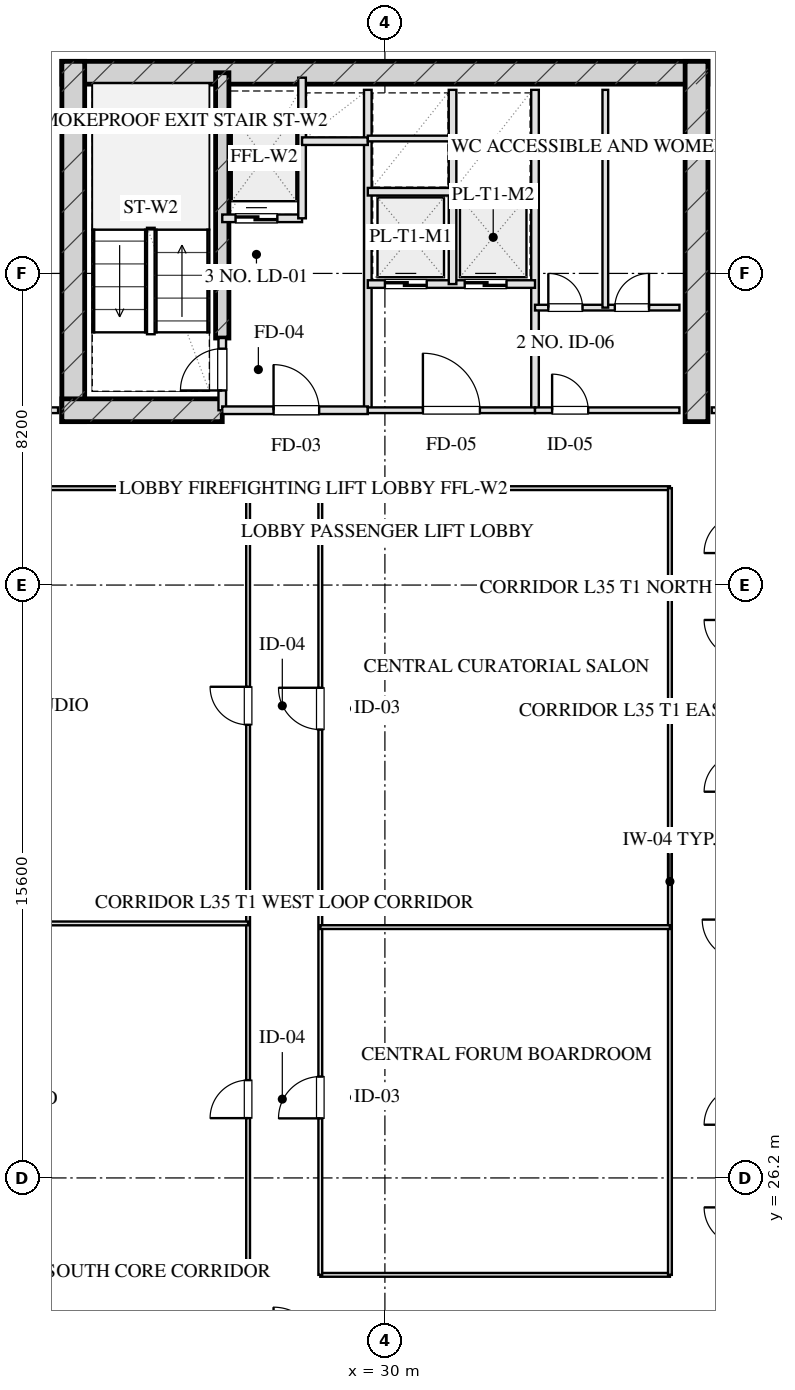
"""IFC4 building model, lengths in metres.
Left out: names, types, materials, properties, quantities, classifications, styles, units other than length and angle.
Written with IfcOpenShell. Run it as: python <this file> out.ifc"""

import sys

from ifc_helpers import new_model, si_unit, direction, frame, frame_2d, origin, place, context, subcontext, project, spatial, rectangle, extrude, element, fill, save


model = new_model("IFC4")
c1 = context("Model", 3, precision=1e-05, world=origin(), true_north=direction((0.0, 1.0)))
c2 = subcontext(c1, "Body", "Model", "MODEL_VIEW")
j1 = project(units=[si_unit("LENGTHUNIT", "METRE"), si_unit("PLANEANGLEUNIT", "RADIAN")], contexts=[c1])
p1 = place(None, origin())
s1 = spatial("IfcSite", under=j1, at=p1, CompositionType="ELEMENT")
p2 = place(p1, origin())
s2 = spatial("IfcBuilding", under=s1, at=p2, CompositionType="ELEMENT")
p3 = place(p2, frame((0.0, 0.0, 134.55)))
s3 = spatial("IfcBuildingStorey", under=s2, at=p3, CompositionType="ELEMENT", Elevation=134.55)
p4 = place(p3, frame((21.5, 55.28, 0.0), z_axis=(0.0, 0.0, 1.0), x_axis=(1.0, 0.0, 0.0)))
e1 = element("IfcWall", 1, at=p4, inside=s3, PredefinedType="SHEAR", context=c2, shape_type="SweptSolid", body=[
    extrude(rectangle(XDim=17.0, YDim=0.6, at=frame_2d((8.5, 0.0))), origin(), (0.0, 0.0, 1.0), 3.45),
])
for number, where, z_axis, x_axis in (
    (2, (21.8, 46.1, 0.0), (0.0, 0.0, 1.0), (0.0, 1.0, 0.0)),
    (3, (38.2, 46.1, 0.0), (0.0, 0.0, 1.0), (0.0, 1.0, 0.0)),
):
    element("IfcWall", number, at=place(p3, frame(where, z_axis=z_axis, x_axis=x_axis)), inside=s3, PredefinedType="SHEAR", context=c2, shape_type="SweptSolid", body=[
        extrude(rectangle(XDim=9.48, YDim=0.6, at=frame_2d((4.74, 0.0))), origin(), (0.0, 0.0, 1.0), 3.45),
    ])
p5 = place(p3, frame((25.72, 48.3, 0.0), z_axis=(0.0, 0.0, 1.0), x_axis=(0.0, 1.0, 0.0)))
e4 = element("IfcWall", 4, at=p5, inside=s3, PredefinedType="SHEAR", context=c2, shape_type="SweptSolid", body=[
    extrude(rectangle(XDim=6.98, YDim=0.35, at=frame_2d((3.49, 0.0))), origin(), (0.0, 0.0, 1.0), 3.45),
])
p6 = place(p3, frame((21.5, 46.4, 0.0), z_axis=(0.0, 0.0, 1.0), x_axis=(1.0, 0.0, 0.0)))
e5 = element("IfcWall", 5, at=p6, inside=s3, PredefinedType="SHEAR", context=c2, shape_type="SweptSolid", body=[
    extrude(rectangle(XDim=4.22, YDim=0.6, at=frame_2d((2.11, 0.0))), origin(), (0.0, 0.0, 1.0), 3.45),
])
p7 = place(p3, frame((25.72, 46.4, 0.0), z_axis=(0.0, 0.0, 1.0), x_axis=(0.0, 1.0, 0.0)))
e6 = element("IfcWall", 6, at=p7, inside=s3, PredefinedType="PARTITIONING", context=c2, shape_type="SweptSolid", body=[
    extrude(rectangle(XDim=1.9, YDim=0.2, at=frame_2d((0.95, 0.0))), origin(), (0.0, 0.0, 1.0), 3.155),
])
p8 = place(p7, frame((0.52, 0.0, 0.0)))
e7 = element("IfcOpeningElement", 7, at=p8, cuts=e6, PredefinedType="OPENING", context=c2, shape_type="SweptSolid", body=[
    extrude(rectangle(XDim=1.1, YDim=2.05, at=frame_2d((0.55, 1.025))), frame((0.0, 0.11, 0.0), z_axis=(0.0, -1.0, 0.0), x_axis=(1.0, 0.0, 0.0)), (0.0, 0.0, 1.0), 0.22),
])
p9 = place(p3, frame((29.55, 46.4, 0.0), z_axis=(0.0, 0.0, 1.0), x_axis=(0.0, 1.0, 0.0)))
e8 = element("IfcWall", 8, at=p9, inside=s3, PredefinedType="PARTITIONING", context=c2, shape_type="SweptSolid", body=[
    extrude(rectangle(XDim=8.43, YDim=0.2, at=frame_2d((4.215, 0.0))), origin(), (0.0, 0.0, 1.0), 3.155),
])
p10 = place(p3, frame((25.72, 46.4, 0.0), z_axis=(0.0, 0.0, 1.0), x_axis=(1.0, 0.0, 0.0)))
e9 = element("IfcWall", 9, at=p10, inside=s3, PredefinedType="PARTITIONING", context=c2, shape_type="SweptSolid", body=[
    extrude(rectangle(XDim=3.83, YDim=0.2, at=frame_2d((1.915, 0.0))), origin(), (0.0, 0.0, 1.0), 3.155),
])
p11 = place(p10, frame((1.35, 0.0, 0.0)))
e10 = element("IfcOpeningElement", 10, at=p11, cuts=e9, PredefinedType="OPENING", context=c2, shape_type="SweptSolid", body=[
    extrude(rectangle(XDim=1.2, YDim=2.05, at=frame_2d((0.6, 1.025))), frame((0.0, 0.11, 0.0), z_axis=(0.0, -1.0, 0.0), x_axis=(1.0, 0.0, 0.0)), (0.0, 0.0, 1.0), 0.22),
])
p12 = place(p3, frame((25.72, 51.45, 0.0), z_axis=(0.0, 0.0, 1.0), x_axis=(1.0, 0.0, 0.0)))
e11 = element("IfcWall", 11, at=p12, inside=s3, PredefinedType="PARTITIONING", context=c2, shape_type="SweptSolid", body=[
    extrude(rectangle(XDim=2.1, YDim=0.2, at=frame_2d((1.05, 0.0))), origin(), (0.0, 0.0, 1.0), 3.155),
])
p13 = place(p12, frame((0.35, 0.0, 0.0)))
e12 = element("IfcOpeningElement", 12, at=p13, cuts=e11, PredefinedType="OPENING", context=c2, shape_type="SweptSolid", body=[
    extrude(rectangle(XDim=1.1, YDim=2.05, at=frame_2d((0.55, 1.025))), frame((0.0, 0.11, 0.0), z_axis=(0.0, -1.0, 0.0), x_axis=(1.0, 0.0, 0.0)), (0.0, 0.0, 1.0), 0.22),
])
p14 = place(p3, frame((27.82, 51.45, 0.0), z_axis=(0.0, 0.0, 1.0), x_axis=(0.0, 1.0, 0.0)))
e13 = element("IfcWall", 13, at=p14, inside=s3, PredefinedType="PARTITIONING", context=c2, shape_type="SweptSolid", body=[
    extrude(rectangle(XDim=3.7, YDim=0.2, at=frame_2d((1.85, 0.0))), origin(), (0.0, 0.0, 1.0), 3.155),
])
p15 = place(p3, frame((27.82, 53.48, 0.0), z_axis=(0.0, 0.0, 1.0), x_axis=(1.0, 0.0, 0.0)))
e14 = element("IfcWall", 14, at=p15, inside=s3, PredefinedType="PARTITIONING", context=c2, shape_type="SweptSolid", body=[
    extrude(rectangle(XDim=1.73, YDim=0.2, at=frame_2d((0.865, 0.0))), origin(), (0.0, 0.0, 1.0), 3.155),
])
p16 = place(p3, frame((33.95, 46.4, 0.0), z_axis=(0.0, 0.0, 1.0), x_axis=(0.0, 1.0, 0.0)))
e15 = element("IfcWall", 15, at=p16, inside=s3, PredefinedType="PARTITIONING", context=c2, shape_type="SweptSolid", body=[
    extrude(rectangle(XDim=8.43, YDim=0.2, at=frame_2d((4.215, 0.0))), origin(), (0.0, 0.0, 1.0), 3.155),
])
p17 = place(p3, frame((29.55, 46.4, 0.0), z_axis=(0.0, 0.0, 1.0), x_axis=(1.0, 0.0, 0.0)))
e16 = element("IfcWall", 16, at=p17, inside=s3, PredefinedType="PARTITIONING", context=c2, shape_type="SweptSolid", body=[
    extrude(rectangle(XDim=4.4, YDim=0.15, at=frame_2d((2.2, 0.0))), origin(), (0.0, 0.0, 1.0), 3.155),
])
p18 = place(p17, frame((1.45, 0.0, 0.0)))
e17 = element("IfcOpeningElement", 17, at=p18, cuts=e16, PredefinedType="OPENING", context=c2, shape_type="SweptSolid", body=[
    extrude(rectangle(XDim=1.5, YDim=2.05, at=frame_2d((0.75, 1.025))), frame((0.0, 0.085, 0.0), z_axis=(0.0, -1.0, 0.0), x_axis=(1.0, 0.0, 0.0)), (0.0, 0.0, 1.0), 0.17),
])
p19 = place(p3, frame((29.55, 49.72, 0.0), z_axis=(0.0, 0.0, 1.0), x_axis=(1.0, 0.0, 0.0)))
e18 = element("IfcWall", 18, at=p19, inside=s3, PredefinedType="PARTITIONING", context=c2, shape_type="SweptSolid", body=[
    extrude(rectangle(XDim=4.4, YDim=0.2, at=frame_2d((2.2, 0.0))), origin(), (0.0, 0.0, 1.0), 3.155),
])
p20 = place(p19, frame((0.45, 0.0, 0.0)))
e19 = element("IfcOpeningElement", 19, at=p20, cuts=e18, PredefinedType="OPENING", context=c2, shape_type="SweptSolid", body=[
    extrude(rectangle(XDim=1.1, YDim=2.05, at=frame_2d((0.55, 1.025))), frame((0.0, 0.11, 0.0), z_axis=(0.0, -1.0, 0.0), x_axis=(1.0, 0.0, 0.0)), (0.0, 0.0, 1.0), 0.22),
])
p21 = place(p19, frame((2.55, 0.0, 0.0)))
e20 = element("IfcOpeningElement", 20, at=p21, cuts=e18, PredefinedType="OPENING", context=c2, shape_type="SweptSolid", body=[
    extrude(rectangle(XDim=1.1, YDim=2.05, at=frame_2d((0.55, 1.025))), frame((0.0, 0.11, 0.0), z_axis=(0.0, -1.0, 0.0), x_axis=(1.0, 0.0, 0.0)), (0.0, 0.0, 1.0), 0.22),
])
p22 = place(p3, frame((31.78, 49.72, 0.0), z_axis=(0.0, 0.0, 1.0), x_axis=(0.0, 1.0, 0.0)))
e21 = element("IfcWall", 21, at=p22, inside=s3, PredefinedType="PARTITIONING", context=c2, shape_type="SweptSolid", body=[
    extrude(rectangle(XDim=5.11, YDim=0.2, at=frame_2d((2.555, 0.0))), origin(), (0.0, 0.0, 1.0), 3.155),
])
p23 = place(p3, frame((29.55, 52.15, 0.0), z_axis=(0.0, 0.0, 1.0), x_axis=(1.0, 0.0, 0.0)))
e22 = element("IfcWall", 22, at=p23, inside=s3, PredefinedType="PARTITIONING", context=c2, shape_type="SweptSolid", body=[
    extrude(rectangle(XDim=4.4, YDim=0.2, at=frame_2d((2.2, 0.0))), origin(), (0.0, 0.0, 1.0), 3.155),
])
p24 = place(p3, frame((29.55, 53.55, 0.0), z_axis=(0.0, 0.0, 1.0), x_axis=(1.0, 0.0, 0.0)))
e23 = element("IfcWall", 23, at=p24, inside=s3, PredefinedType="PARTITIONING", context=c2, shape_type="SweptSolid", body=[
    extrude(rectangle(XDim=2.23, YDim=0.15, at=frame_2d((1.115, 0.0))), origin(), (0.0, 0.0, 1.0), 3.155),
])
p25 = place(p3, frame((33.95, 46.4, 0.0), z_axis=(0.0, 0.0, 1.0), x_axis=(1.0, 0.0, 0.0)))
e24 = element("IfcWall", 24, at=p25, inside=s3, PredefinedType="PARTITIONING", context=c2, shape_type="SweptSolid", body=[
    extrude(rectangle(XDim=3.8, YDim=0.15, at=frame_2d((1.9, 0.0))), origin(), (0.0, 0.0, 1.0), 3.155),
])
p26 = place(p25, frame((0.45, 0.0, 0.0)))
e25 = element("IfcOpeningElement", 25, at=p26, cuts=e24, PredefinedType="OPENING", context=c2, shape_type="SweptSolid", body=[
    extrude(rectangle(XDim=0.95, YDim=2.05, at=frame_2d((0.475, 1.025))), frame((0.0, 0.085, 0.0), z_axis=(0.0, -1.0, 0.0), x_axis=(1.0, 0.0, 0.0)), (0.0, 0.0, 1.0), 0.17),
])
p27 = place(p3, frame((33.95, 49.1, 0.0), z_axis=(0.0, 0.0, 1.0), x_axis=(1.0, 0.0, 0.0)))
e26 = element("IfcWall", 26, at=p27, inside=s3, PredefinedType="PARTITIONING", context=c2, shape_type="SweptSolid", body=[
    extrude(rectangle(XDim=3.8, YDim=0.15, at=frame_2d((1.9, 0.0))), origin(), (0.0, 0.0, 1.0), 3.155),
])
p28 = place(p27, frame((0.35, 0.0, 0.0)))
e27 = element("IfcOpeningElement", 27, at=p28, cuts=e26, PredefinedType="OPENING", context=c2, shape_type="SweptSolid", body=[
    extrude(rectangle(XDim=0.9, YDim=2.05, at=frame_2d((0.45, 1.025))), frame((0.0, 0.085, 0.0), z_axis=(0.0, -1.0, 0.0), x_axis=(1.0, 0.0, 0.0)), (0.0, 0.0, 1.0), 0.17),
])
p29 = place(p27, frame((2.1, 0.0, 0.0)))
e28 = element("IfcOpeningElement", 28, at=p29, cuts=e26, PredefinedType="OPENING", context=c2, shape_type="SweptSolid", body=[
    extrude(rectangle(XDim=0.9, YDim=2.05, at=frame_2d((0.45, 1.025))), frame((0.0, 0.085, 0.0), z_axis=(0.0, -1.0, 0.0), x_axis=(1.0, 0.0, 0.0)), (0.0, 0.0, 1.0), 0.17),
])
p30 = place(p3, frame((35.8, 49.1, 0.0), z_axis=(0.0, 0.0, 1.0), x_axis=(0.0, 1.0, 0.0)))
e29 = element("IfcWall", 29, at=p30, inside=s3, PredefinedType="PARTITIONING", context=c2, shape_type="SweptSolid", body=[
    extrude(rectangle(XDim=5.73, YDim=0.15, at=frame_2d((2.865, 0.0))), origin(), (0.0, 0.0, 1.0), 3.155),
])
p31 = place(p3, frame((11.4, 46.4, 0.0), z_axis=(0.0, 0.0, 1.0), x_axis=(1.0, 0.0, 0.0)))
e30 = element("IfcWall", 30, at=p31, inside=s3, PredefinedType="PARTITIONING", context=c2, shape_type="SweptSolid", body=[
    extrude(rectangle(XDim=10.0, YDim=0.15, at=frame_2d((5.0, 0.0))), origin(), (0.0, 0.0, 1.0), 3.155),
])
p32 = place(p31, frame((4.2, 0.0, 0.0)))
e31 = element("IfcOpeningElement", 31, at=p32, cuts=e30, PredefinedType="OPENING", context=c2, shape_type="SweptSolid", body=[
    extrude(rectangle(XDim=1.0, YDim=2.05, at=frame_2d((0.5, 1.025))), frame((0.0, 0.085, 0.0), z_axis=(0.0, -1.0, 0.0), x_axis=(1.0, 0.0, 0.0)), (0.0, 0.0, 1.0), 0.17),
])
p33 = place(p3, frame((38.6, 46.4, 0.0), z_axis=(0.0, 0.0, 1.0), x_axis=(1.0, 0.0, 0.0)))
e32 = element("IfcWall", 32, at=p33, inside=s3, PredefinedType="PARTITIONING", context=c2, shape_type="SweptSolid", body=[
    extrude(rectangle(XDim=10.0, YDim=0.15, at=frame_2d((5.0, 0.0))), origin(), (0.0, 0.0, 1.0), 3.155),
])
p34 = place(p33, frame((4.2, 0.0, 0.0)))
e33 = element("IfcOpeningElement", 33, at=p34, cuts=e32, PredefinedType="OPENING", context=c2, shape_type="SweptSolid", body=[
    extrude(rectangle(XDim=1.05, YDim=2.05, at=frame_2d((0.525, 1.025))), frame((0.0, 0.085, 0.0), z_axis=(0.0, -1.0, 0.0), x_axis=(1.0, 0.0, 0.0)), (0.0, 0.0, 1.0), 0.17),
])
p35 = place(p3, frame((11.4, 23.65, 0.0), z_axis=(0.0, 0.0, 1.0), x_axis=(1.0, 0.0, 0.0)))
e34 = element("IfcWall", 34, at=p35, inside=s3, PredefinedType="MOVABLE", context=c2, shape_type="SweptSolid", body=[
    extrude(rectangle(XDim=15.0, YDim=0.1, at=frame_2d((7.5, 0.0))), origin(), (0.0, 0.0, 1.0), 3.155),
])
p36 = place(p3, frame((28.3, 23.65, 0.0), z_axis=(0.0, 0.0, 1.0), x_axis=(1.0, 0.0, 0.0)))
e35 = element("IfcWall", 35, at=p36, inside=s3, PredefinedType="MOVABLE", context=c2, shape_type="SweptSolid", body=[
    extrude(rectangle(XDim=9.2, YDim=0.1, at=frame_2d((4.6, 0.0))), origin(), (0.0, 0.0, 1.0), 3.155),
])
p37 = place(p3, frame((11.4, 44.35, 0.0), z_axis=(0.0, 0.0, 1.0), x_axis=(1.0, 0.0, 0.0)))
e36 = element("IfcWall", 36, at=p37, inside=s3, PredefinedType="MOVABLE", context=c2, shape_type="SweptSolid", body=[
    extrude(rectangle(XDim=15.0, YDim=0.1, at=frame_2d((7.5, 0.0))), origin(), (0.0, 0.0, 1.0), 3.155),
])
p38 = place(p3, frame((28.3, 44.35, 0.0), z_axis=(0.0, 0.0, 1.0), x_axis=(1.0, 0.0, 0.0)))
e37 = element("IfcWall", 37, at=p38, inside=s3, PredefinedType="MOVABLE", context=c2, shape_type="SweptSolid", body=[
    extrude(rectangle(XDim=9.2, YDim=0.1, at=frame_2d((4.6, 0.0))), origin(), (0.0, 0.0, 1.0), 3.155),
])
p39 = place(p3, frame((26.4, 23.65, 0.0), z_axis=(0.0, 0.0, 1.0), x_axis=(0.0, 1.0, 0.0)))
e38 = element("IfcWall", 38, at=p39, inside=s3, PredefinedType="MOVABLE", context=c2, shape_type="SweptSolid", body=[
    extrude(rectangle(XDim=20.7, YDim=0.1, at=frame_2d((10.35, 0.0))), origin(), (0.0, 0.0, 1.0), 3.155),
])
p40 = place(p39, frame((4.124, 0.0, 0.0)))
e39 = element("IfcOpeningElement", 39, at=p40, cuts=e38, PredefinedType="OPENING", context=c2, shape_type="SweptSolid", body=[
    extrude(rectangle(XDim=1.0, YDim=2.05, at=frame_2d((0.5, 1.025))), frame((0.0, 0.06, 0.0), z_axis=(0.0, -1.0, 0.0), x_axis=(1.0, 0.0, 0.0)), (0.0, 0.0, 1.0), 0.12),
])
p41 = place(p39, frame((14.473, 0.0, 0.0)))
e40 = element("IfcOpeningElement", 40, at=p41, cuts=e38, PredefinedType="OPENING", context=c2, shape_type="SweptSolid", body=[
    extrude(rectangle(XDim=1.0, YDim=2.05, at=frame_2d((0.5, 1.025))), frame((0.0, 0.06, 0.0), z_axis=(0.0, -1.0, 0.0), x_axis=(1.0, 0.0, 0.0)), (0.0, 0.0, 1.0), 0.12),
])
p42 = place(p3, frame((28.3, 23.65, 0.0), z_axis=(0.0, 0.0, 1.0), x_axis=(0.0, 1.0, 0.0)))
e41 = element("IfcWall", 41, at=p42, inside=s3, PredefinedType="MOVABLE", context=c2, shape_type="SweptSolid", body=[
    extrude(rectangle(XDim=20.7, YDim=0.1, at=frame_2d((10.35, 0.0))), origin(), (0.0, 0.0, 1.0), 3.155),
])
p43 = place(p42, frame((4.117, 0.0, 0.0)))
e42 = element("IfcOpeningElement", 42, at=p43, cuts=e41, PredefinedType="OPENING", context=c2, shape_type="SweptSolid", body=[
    extrude(rectangle(XDim=1.1, YDim=2.05, at=frame_2d((0.55, 1.025))), frame((0.0, 0.06, 0.0), z_axis=(0.0, -1.0, 0.0), x_axis=(1.0, 0.0, 0.0)), (0.0, 0.0, 1.0), 0.12),
])
p44 = place(p42, frame((14.347, 0.0, 0.0)))
e43 = element("IfcOpeningElement", 43, at=p44, cuts=e41, PredefinedType="OPENING", context=c2, shape_type="SweptSolid", body=[
    extrude(rectangle(XDim=1.1, YDim=2.05, at=frame_2d((0.55, 1.025))), frame((0.0, 0.06, 0.0), z_axis=(0.0, -1.0, 0.0), x_axis=(1.0, 0.0, 0.0)), (0.0, 0.0, 1.0), 0.12),
])
p45 = place(p3, frame((37.5, 23.65, 0.0), z_axis=(0.0, 0.0, 1.0), x_axis=(0.0, 1.0, 0.0)))
e44 = element("IfcWall", 44, at=p45, inside=s3, PredefinedType="MOVABLE", context=c2, shape_type="SweptSolid", body=[
    extrude(rectangle(XDim=20.7, YDim=0.1, at=frame_2d((10.35, 0.0))), origin(), (0.0, 0.0, 1.0), 3.155),
])
p46 = place(p3, frame((28.3, 32.8, 0.0), z_axis=(0.0, 0.0, 1.0), x_axis=(1.0, 0.0, 0.0)))
e45 = element("IfcWall", 45, at=p46, inside=s3, PredefinedType="MOVABLE", context=c2, shape_type="SweptSolid", body=[
    extrude(rectangle(XDim=9.2, YDim=0.1, at=frame_2d((4.6, 0.0))), origin(), (0.0, 0.0, 1.0), 3.155),
])
p47 = place(p3, frame((11.4, 32.897, 0.0), z_axis=(0.0, 0.0, 1.0), x_axis=(1.0, 0.0, 0.0)))
e46 = element("IfcWall", 46, at=p47, inside=s3, PredefinedType="MOVABLE", context=c2, shape_type="SweptSolid", body=[
    extrude(rectangle(XDim=15.0, YDim=0.1, at=frame_2d((7.5, 0.0))), origin(), (0.0, 0.0, 1.0), 3.155),
])
p48 = place(p8, origin())
e47 = element("IfcDoor", 47, at=p48, inside=s3, OperationType="SINGLE_SWING_LEFT", PredefinedType="DOOR", context=c2, shape_type="SweptSolid", body=[
    extrude(rectangle(XDim=1.1, YDim=2.05, at=frame_2d((0.55, 1.025))), frame((0.0, 0.025, 0.0), z_axis=(0.0, -1.0, 0.0), x_axis=(1.0, 0.0, 0.0)), (0.0, 0.0, 1.0), 0.05),
])
fill(e7, e47)
p49 = place(p11, origin())
e48 = element("IfcDoor", 48, at=p49, inside=s3, OperationType="SINGLE_SWING_LEFT", PredefinedType="DOOR", context=c2, shape_type="SweptSolid", body=[
    extrude(rectangle(XDim=1.2, YDim=2.05, at=frame_2d((0.6, 1.025))), frame((0.0, 0.025, 0.0), z_axis=(0.0, -1.0, 0.0), x_axis=(1.0, 0.0, 0.0)), (0.0, 0.0, 1.0), 0.05),
])
fill(e10, e48)
p50 = place(p13, origin())
e49 = element("IfcDoor", 49, at=p50, inside=s3, OperationType="DOUBLE_DOOR_SLIDING", PredefinedType="DOOR", context=c2, shape_type="SweptSolid", body=[
    extrude(rectangle(XDim=1.1, YDim=2.05, at=frame_2d((0.55, 1.025))), frame((0.0, 0.025, 0.0), z_axis=(0.0, -1.0, 0.0), x_axis=(1.0, 0.0, 0.0)), (0.0, 0.0, 1.0), 0.05),
])
fill(e12, e49)
p51 = place(p18, origin())
e50 = element("IfcDoor", 50, at=p51, inside=s3, OperationType="SINGLE_SWING_LEFT", PredefinedType="DOOR", context=c2, shape_type="SweptSolid", body=[
    extrude(rectangle(XDim=1.5, YDim=2.05, at=frame_2d((0.75, 1.025))), frame((0.0, 0.025, 0.0), z_axis=(0.0, -1.0, 0.0), x_axis=(1.0, 0.0, 0.0)), (0.0, 0.0, 1.0), 0.05),
])
fill(e17, e50)
p52 = place(p20, origin())
e51 = element("IfcDoor", 51, at=p52, inside=s3, OperationType="DOUBLE_DOOR_SLIDING", PredefinedType="DOOR", context=c2, shape_type="SweptSolid", body=[
    extrude(rectangle(XDim=1.1, YDim=2.05, at=frame_2d((0.55, 1.025))), frame((0.0, 0.025, 0.0), z_axis=(0.0, -1.0, 0.0), x_axis=(1.0, 0.0, 0.0)), (0.0, 0.0, 1.0), 0.05),
])
fill(e19, e51)
p53 = place(p21, origin())
e52 = element("IfcDoor", 52, at=p53, inside=s3, OperationType="DOUBLE_DOOR_SLIDING", PredefinedType="DOOR", context=c2, shape_type="SweptSolid", body=[
    extrude(rectangle(XDim=1.1, YDim=2.05, at=frame_2d((0.55, 1.025))), frame((0.0, 0.025, 0.0), z_axis=(0.0, -1.0, 0.0), x_axis=(1.0, 0.0, 0.0)), (0.0, 0.0, 1.0), 0.05),
])
fill(e20, e52)
p54 = place(p26, origin())
e53 = element("IfcDoor", 53, at=p54, inside=s3, OperationType="SINGLE_SWING_LEFT", PredefinedType="DOOR", context=c2, shape_type="SweptSolid", body=[
    extrude(rectangle(XDim=0.95, YDim=2.05, at=frame_2d((0.475, 1.025))), frame((0.0, 0.025, 0.0), z_axis=(0.0, -1.0, 0.0), x_axis=(1.0, 0.0, 0.0)), (0.0, 0.0, 1.0), 0.05),
])
fill(e25, e53)
p55 = place(p28, origin())
e54 = element("IfcDoor", 54, at=p55, inside=s3, OperationType="SINGLE_SWING_LEFT", PredefinedType="DOOR", context=c2, shape_type="SweptSolid", body=[
    extrude(rectangle(XDim=0.9, YDim=2.05, at=frame_2d((0.45, 1.025))), frame((0.0, 0.025, 0.0), z_axis=(0.0, -1.0, 0.0), x_axis=(1.0, 0.0, 0.0)), (0.0, 0.0, 1.0), 0.05),
])
fill(e27, e54)
p56 = place(p29, origin())
e55 = element("IfcDoor", 55, at=p56, inside=s3, OperationType="SINGLE_SWING_RIGHT", PredefinedType="DOOR", context=c2, shape_type="SweptSolid", body=[
    extrude(rectangle(XDim=0.9, YDim=2.05, at=frame_2d((0.45, 1.025))), frame((0.0, 0.025, 0.0), z_axis=(0.0, -1.0, 0.0), x_axis=(1.0, 0.0, 0.0)), (0.0, 0.0, 1.0), 0.05),
])
fill(e28, e55)
p57 = place(p40, origin())
e56 = element("IfcDoor", 56, at=p57, inside=s3, OperationType="SINGLE_SWING_LEFT", PredefinedType="DOOR", context=c2, shape_type="SweptSolid", body=[
    extrude(rectangle(XDim=1.0, YDim=2.05, at=frame_2d((0.5, 1.025))), frame((0.0, 0.025, 0.0), z_axis=(0.0, -1.0, 0.0), x_axis=(1.0, 0.0, 0.0)), (0.0, 0.0, 1.0), 0.05),
])
fill(e39, e56)
p58 = place(p41, origin())
e57 = element("IfcDoor", 57, at=p58, inside=s3, OperationType="SINGLE_SWING_RIGHT", PredefinedType="DOOR", context=c2, shape_type="SweptSolid", body=[
    extrude(rectangle(XDim=1.0, YDim=2.05, at=frame_2d((0.5, 1.025))), frame((0.0, 0.025, 0.0), z_axis=(0.0, -1.0, 0.0), x_axis=(1.0, 0.0, 0.0)), (0.0, 0.0, 1.0), 0.05),
])
fill(e40, e57)
p59 = place(p43, origin())
e58 = element("IfcDoor", 58, at=p59, inside=s3, OperationType="SINGLE_SWING_LEFT", PredefinedType="DOOR", context=c2, shape_type="SweptSolid", body=[
    extrude(rectangle(XDim=1.1, YDim=2.05, at=frame_2d((0.55, 1.025))), frame((0.0, 0.025, 0.0), z_axis=(0.0, -1.0, 0.0), x_axis=(1.0, 0.0, 0.0)), (0.0, 0.0, 1.0), 0.05),
])
fill(e42, e58)
p60 = place(p44, origin())
e59 = element("IfcDoor", 59, at=p60, inside=s3, OperationType="SINGLE_SWING_RIGHT", PredefinedType="DOOR", context=c2, shape_type="SweptSolid", body=[
    extrude(rectangle(XDim=1.1, YDim=2.05, at=frame_2d((0.55, 1.025))), frame((0.0, 0.025, 0.0), z_axis=(0.0, -1.0, 0.0), x_axis=(1.0, 0.0, 0.0)), (0.0, 0.0, 1.0), 0.05),
])
fill(e43, e59)
save(model, sys.argv[1])
